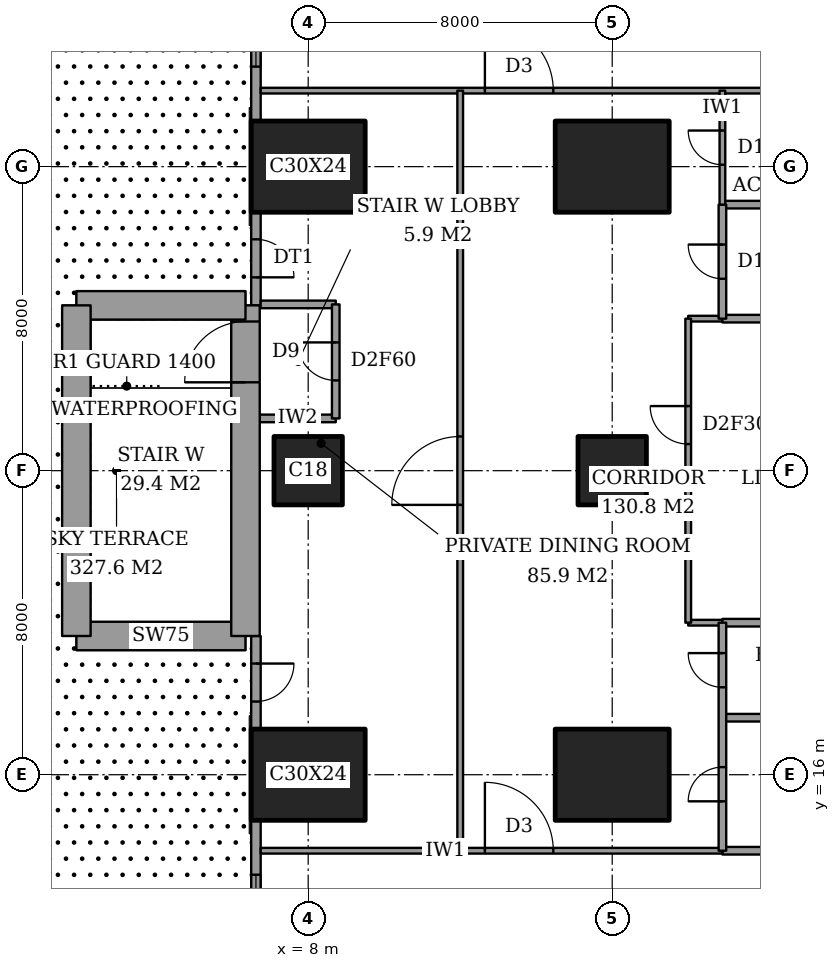
"""IFC4 building model, lengths in metres.
Left out: names, types, materials, properties, quantities, classifications, styles, units other than length and angle.
Written with IfcOpenShell. Run it as: python <this file> out.ifc"""

import sys

from ifc_helpers import new_model, si_unit, direction, frame, frame_2d, origin, origin_2d, place, context, subcontext, project, spatial, rectangle, extrude, element, fill, save


model = new_model("IFC4")
c1 = context("Model", 3, precision=1e-05, world=origin(), true_north=direction((0.0, 1.0)))
c2 = subcontext(c1, "Body", "Model", "MODEL_VIEW")
j1 = project(units=[si_unit("LENGTHUNIT", "METRE"), si_unit("PLANEANGLEUNIT", "RADIAN")], contexts=[c1])
p1 = place(None, origin())
s1 = spatial("IfcSite", under=j1, at=p1, CompositionType="ELEMENT")
p2 = place(p1, origin())
s2 = spatial("IfcBuilding", under=s1, at=p2, CompositionType="ELEMENT")
p3 = place(p2, frame((0.0, 0.0, 218.2)))
s3 = spatial("IfcBuildingStorey", under=s2, at=p3, CompositionType="ELEMENT", Elevation=218.2)
p4 = place(p3, frame((8.0, 16.0, 0.0), z_axis=(0.0, 0.0, 1.0), x_axis=(1.0, 0.0, 0.0)))
e1 = element("IfcColumn", 1, at=p4, inside=s3, PredefinedType="COLUMN", context=c2, shape_type="SweptSolid", body=[
    extrude(rectangle(XDim=3.0, YDim=2.4, at=origin_2d()), origin(), (0.0, 0.0, 1.0), 3.6),
])
p5 = place(p3, frame((8.0, 24.0, 0.0), z_axis=(0.0, 0.0, 1.0), x_axis=(1.0, 0.0, 0.0)))
e2 = element("IfcColumn", 2, at=p5, inside=s3, PredefinedType="COLUMN", context=c2, shape_type="SweptSolid", body=[
    extrude(rectangle(XDim=1.8, YDim=1.8, at=origin_2d()), origin(), (0.0, 0.0, 1.0), 3.6),
])
for number, where, z_axis, x_axis in (
    (3, (8.0, 32.0, 0.0), (0.0, 0.0, 1.0), (1.0, 0.0, 0.0)),
    (4, (16.0, 16.0, 0.0), (0.0, 0.0, 1.0), (1.0, 0.0, 0.0)),
):
    element("IfcColumn", number, at=place(p3, frame(where, z_axis=z_axis, x_axis=x_axis)), inside=s3, PredefinedType="COLUMN", context=c2, shape_type="SweptSolid", body=[
        extrude(rectangle(XDim=3.0, YDim=2.4, at=origin_2d()), origin(), (0.0, 0.0, 1.0), 3.6),
    ])
p6 = place(p3, frame((16.0, 24.0, 0.0), z_axis=(0.0, 0.0, 1.0), x_axis=(1.0, 0.0, 0.0)))
e5 = element("IfcColumn", 5, at=p6, inside=s3, PredefinedType="COLUMN", context=c2, shape_type="SweptSolid", body=[
    extrude(rectangle(XDim=1.8, YDim=1.8, at=origin_2d()), origin(), (0.0, 0.0, 1.0), 3.6),
])
p7 = place(p3, frame((16.0, 32.0, 0.0), z_axis=(0.0, 0.0, 1.0), x_axis=(1.0, 0.0, 0.0)))
e6 = element("IfcColumn", 6, at=p7, inside=s3, PredefinedType="COLUMN", context=c2, shape_type="SweptSolid", body=[
    extrude(rectangle(XDim=3.0, YDim=2.4, at=origin_2d()), origin(), (0.0, 0.0, 1.0), 3.6),
])
p8 = place(p3, frame((1.9, 19.65, 0.0), z_axis=(0.0, 0.0, 1.0), x_axis=(1.0, 0.0, 0.0)))
e7 = element("IfcWall", 7, at=p8, inside=s3, PredefinedType="SHEAR", context=c2, shape_type="SweptSolid", body=[
    extrude(rectangle(XDim=4.45, YDim=0.75, at=frame_2d((2.225, 0.0))), origin(), (0.0, 0.0, 1.0), 3.6),
])
p9 = place(p3, frame((6.35, 19.65, 0.0), z_axis=(0.0, 0.0, 1.0), x_axis=(0.0, 1.0, 0.0)))
e8 = element("IfcWall", 8, at=p9, inside=s3, PredefinedType="SHEAR", context=c2, shape_type="SweptSolid", body=[
    extrude(rectangle(XDim=8.7, YDim=0.75, at=frame_2d((4.35, 0.0))), origin(), (0.0, 0.0, 1.0), 3.6),
])
p10 = place(p9, frame((6.675, 0.0, 0.0)))
e9 = element("IfcOpeningElement", 9, at=p10, cuts=e8, PredefinedType="OPENING", context=c2, shape_type="SweptSolid", body=[
    extrude(rectangle(XDim=1.6, YDim=2.1, at=frame_2d((0.8, 1.05))), frame((0.0, 0.385, 0.0), z_axis=(0.0, -1.0, 0.0), x_axis=(1.0, 0.0, 0.0)), (0.0, 0.0, 1.0), 0.77),
])
p11 = place(p3, frame((6.35, 28.35, 0.0), z_axis=(0.0, 0.0, 1.0), x_axis=(-1.0, 0.0, 0.0)))
e10 = element("IfcWall", 10, at=p11, inside=s3, PredefinedType="SHEAR", context=c2, shape_type="SweptSolid", body=[
    extrude(rectangle(XDim=4.45, YDim=0.75, at=frame_2d((2.225, 0.0))), origin(), (0.0, 0.0, 1.0), 3.6),
])
p12 = place(p3, frame((1.9, 28.35, 0.0), z_axis=(0.0, 0.0, 1.0), x_axis=(0.0, -1.0, 0.0)))
e11 = element("IfcWall", 11, at=p12, inside=s3, PredefinedType="SHEAR", context=c2, shape_type="SweptSolid", body=[
    extrude(rectangle(XDim=8.7, YDim=0.75, at=frame_2d((4.35, 0.0))), origin(), (0.0, 0.0, 1.0), 3.6),
])
p13 = place(p3, frame((6.625, 48.575, 0.0), z_axis=(0.0, 0.0, 1.0), x_axis=(0.0, -1.0, 0.0)))
e12 = element("IfcWall", 12, at=p13, inside=s3, PredefinedType="SOLIDWALL", context=c2, shape_type="SweptSolid", body=[
    extrude(rectangle(XDim=20.225, YDim=0.25, at=frame_2d((10.112, 0.0))), origin(), (0.0, 0.0, 1.0), 3.6),
])
p14 = place(p13, frame((6.55, 0.0, 0.0)))
e13 = element("IfcOpeningElement", 13, at=p14, cuts=e12, PredefinedType="OPENING", context=c2, shape_type="SweptSolid", body=[
    extrude(rectangle(XDim=1.0, YDim=2.4, at=frame_2d((0.5, 1.2))), frame((0.0, 0.135, 0.0), z_axis=(0.0, -1.0, 0.0), x_axis=(1.0, 0.0, 0.0)), (0.0, 0.0, 1.0), 0.27),
])
p15 = place(p13, frame((1.988, 0.0, 0.2)))
e14 = element("IfcOpeningElement", 14, at=p15, cuts=e12, PredefinedType="OPENING", context=c2, shape_type="SweptSolid", body=[
    extrude(rectangle(XDim=2.4, YDim=2.4, at=frame_2d((1.2, 1.2))), frame((0.0, 0.135, 0.0), z_axis=(0.0, -1.0, 0.0), x_axis=(1.0, 0.0, 0.0)), (0.0, 0.0, 1.0), 0.27),
])
p16 = place(p13, frame((8.481, 0.0, 0.2)))
e15 = element("IfcOpeningElement", 15, at=p16, cuts=e12, PredefinedType="OPENING", context=c2, shape_type="SweptSolid", body=[
    extrude(rectangle(XDim=2.4, YDim=2.4, at=frame_2d((1.2, 1.2))), frame((0.0, 0.135, 0.0), z_axis=(0.0, -1.0, 0.0), x_axis=(1.0, 0.0, 0.0)), (0.0, 0.0, 1.0), 0.27),
])
p17 = place(p13, frame((11.544, 0.0, 0.2)))
e16 = element("IfcOpeningElement", 16, at=p17, cuts=e12, PredefinedType="OPENING", context=c2, shape_type="SweptSolid", body=[
    extrude(rectangle(XDim=2.4, YDim=2.4, at=frame_2d((1.2, 1.2))), frame((0.0, 0.135, 0.0), z_axis=(0.0, -1.0, 0.0), x_axis=(1.0, 0.0, 0.0)), (0.0, 0.0, 1.0), 0.27),
])
p18 = place(p13, frame((18.488, 0.0, 0.0)))
e17 = element("IfcOpeningElement", 17, at=p18, cuts=e12, PredefinedType="OPENING", context=c2, shape_type="SweptSolid", body=[
    extrude(rectangle(XDim=1.0, YDim=2.4, at=frame_2d((0.5, 1.2))), frame((0.0, 0.135, 0.0), z_axis=(0.0, -1.0, 0.0), x_axis=(1.0, 0.0, 0.0)), (0.0, 0.0, 1.0), 0.27),
])
p19 = place(p3, frame((6.625, 19.65, 0.0), z_axis=(0.0, 0.0, 1.0), x_axis=(0.0, -1.0, 0.0)))
e18 = element("IfcWall", 18, at=p19, inside=s3, PredefinedType="SOLIDWALL", context=c2, shape_type="SweptSolid", body=[
    extrude(rectangle(XDim=20.225, YDim=0.25, at=frame_2d((10.112, 0.0))), origin(), (0.0, 0.0, 1.0), 3.6),
])
p20 = place(p19, frame((0.725, 0.0, 0.0)))
e19 = element("IfcOpeningElement", 19, at=p20, cuts=e18, PredefinedType="OPENING", context=c2, shape_type="SweptSolid", body=[
    extrude(rectangle(XDim=1.0, YDim=2.4, at=frame_2d((0.5, 1.2))), frame((0.0, 0.135, 0.0), z_axis=(0.0, -1.0, 0.0), x_axis=(1.0, 0.0, 0.0)), (0.0, 0.0, 1.0), 0.27),
])
p21 = place(p19, frame((12.675, 0.0, 0.0)))
e20 = element("IfcOpeningElement", 20, at=p21, cuts=e18, PredefinedType="OPENING", context=c2, shape_type="SweptSolid", body=[
    extrude(rectangle(XDim=1.0, YDim=2.4, at=frame_2d((0.5, 1.2))), frame((0.0, 0.135, 0.0), z_axis=(0.0, -1.0, 0.0), x_axis=(1.0, 0.0, 0.0)), (0.0, 0.0, 1.0), 0.27),
])
p22 = place(p19, frame((6.281, 0.0, 0.2)))
e21 = element("IfcOpeningElement", 21, at=p22, cuts=e18, PredefinedType="OPENING", context=c2, shape_type="SweptSolid", body=[
    extrude(rectangle(XDim=2.4, YDim=2.4, at=frame_2d((1.2, 1.2))), frame((0.0, 0.135, 0.0), z_axis=(0.0, -1.0, 0.0), x_axis=(1.0, 0.0, 0.0)), (0.0, 0.0, 1.0), 0.27),
])
p23 = place(p19, frame((9.344, 0.0, 0.2)))
e22 = element("IfcOpeningElement", 22, at=p23, cuts=e18, PredefinedType="OPENING", context=c2, shape_type="SweptSolid", body=[
    extrude(rectangle(XDim=2.4, YDim=2.4, at=frame_2d((1.2, 1.2))), frame((0.0, 0.135, 0.0), z_axis=(0.0, -1.0, 0.0), x_axis=(1.0, 0.0, 0.0)), (0.0, 0.0, 1.0), 0.27),
])
p24 = place(p19, frame((15.837, 0.0, 0.2)))
e23 = element("IfcOpeningElement", 23, at=p24, cuts=e18, PredefinedType="OPENING", context=c2, shape_type="SweptSolid", body=[
    extrude(rectangle(XDim=2.4, YDim=2.4, at=frame_2d((1.2, 1.2))), frame((0.0, 0.135, 0.0), z_axis=(0.0, -1.0, 0.0), x_axis=(1.0, 0.0, 0.0)), (0.0, 0.0, 1.0), 0.27),
])
p25 = place(p3, frame((18.9, 14.0, 0.0), z_axis=(0.0, 0.0, 1.0), x_axis=(1.0, 0.0, 0.0)))
e24 = element("IfcWall", 24, at=p25, inside=s3, PredefinedType="PARTITIONING", context=c2, shape_type="SweptSolid", body=[
    extrude(rectangle(XDim=5.1, YDim=0.2, at=frame_2d((2.55, 0.0))), origin(), (0.0, 0.0, 1.0), 3.35),
])
p26 = place(p3, frame((6.75, 14.0, 0.0), z_axis=(0.0, 0.0, 1.0), x_axis=(1.0, 0.0, 0.0)))
e25 = element("IfcWall", 25, at=p26, inside=s3, PredefinedType="PARTITIONING", context=c2, shape_type="SweptSolid", body=[
    extrude(rectangle(XDim=12.15, YDim=0.15, at=frame_2d((6.075, 0.0))), origin(), (0.0, 0.0, 1.0), 3.35),
])
p27 = place(p26, frame((5.9, 0.0, 0.0)))
e26 = element("IfcOpeningElement", 26, at=p27, cuts=e25, PredefinedType="OPENING", context=c2, shape_type="SweptSolid", body=[
    extrude(rectangle(XDim=1.8, YDim=2.1, at=frame_2d((0.9, 1.05))), frame((0.0, 0.085, 0.0), z_axis=(0.0, -1.0, 0.0), x_axis=(1.0, 0.0, 0.0)), (0.0, 0.0, 1.0), 0.17),
])
for number, where, z_axis, x_axis in (
    (27, (18.9, 17.5, 0.0), (0.0, 0.0, 1.0), (1.0, 0.0, 0.0)),
    (28, (18.9, 20.0, 0.0), (0.0, 0.0, 1.0), (1.0, 0.0, 0.0)),
):
    element("IfcWall", number, at=place(p3, frame(where, z_axis=z_axis, x_axis=x_axis)), inside=s3, PredefinedType="PARTITIONING", context=c2, shape_type="SweptSolid", body=[
        extrude(rectangle(XDim=5.1, YDim=0.2, at=frame_2d((2.55, 0.0))), origin(), (0.0, 0.0, 1.0), 3.35),
    ])
p28 = place(p3, frame((18.0, 20.0, 0.0), z_axis=(0.0, 0.0, 1.0), x_axis=(1.0, 0.0, 0.0)))
e29 = element("IfcWall", 29, at=p28, inside=s3, PredefinedType="PARTITIONING", context=c2, shape_type="SweptSolid", body=[
    extrude(rectangle(XDim=0.9, YDim=0.15, at=frame_2d((0.45, 0.0))), origin(), (0.0, 0.0, 1.0), 3.35),
])
p29 = place(p3, frame((6.725, 25.375, 0.0), z_axis=(0.0, 0.0, 1.0), x_axis=(1.0, 0.0, 0.0)))
e30 = element("IfcWall", 30, at=p29, inside=s3, PredefinedType="PARTITIONING", context=c2, shape_type="SweptSolid", body=[
    extrude(rectangle(XDim=2.0, YDim=0.2, at=frame_2d((1.0, 0.0))), origin(), (0.0, 0.0, 1.0), 3.35),
])
p30 = place(p3, frame((18.9, 28.0, 0.0), z_axis=(0.0, 0.0, 1.0), x_axis=(1.0, 0.0, 0.0)))
e31 = element("IfcWall", 31, at=p30, inside=s3, PredefinedType="PARTITIONING", context=c2, shape_type="SweptSolid", body=[
    extrude(rectangle(XDim=5.1, YDim=0.2, at=frame_2d((2.55, 0.0))), origin(), (0.0, 0.0, 1.0), 3.35),
])
p31 = place(p3, frame((18.0, 28.0, 0.0), z_axis=(0.0, 0.0, 1.0), x_axis=(1.0, 0.0, 0.0)))
e32 = element("IfcWall", 32, at=p31, inside=s3, PredefinedType="PARTITIONING", context=c2, shape_type="SweptSolid", body=[
    extrude(rectangle(XDim=0.9, YDim=0.15, at=frame_2d((0.45, 0.0))), origin(), (0.0, 0.0, 1.0), 3.35),
])
p32 = place(p3, frame((6.75, 28.375, 0.0), z_axis=(0.0, 0.0, 1.0), x_axis=(1.0, 0.0, 0.0)))
e33 = element("IfcWall", 33, at=p32, inside=s3, PredefinedType="PARTITIONING", context=c2, shape_type="SweptSolid", body=[
    extrude(rectangle(XDim=1.975, YDim=0.2, at=frame_2d((0.988, 0.0))), origin(), (0.0, 0.0, 1.0), 3.35),
])
p33 = place(p3, frame((18.9, 31.0, 0.0), z_axis=(0.0, 0.0, 1.0), x_axis=(1.0, 0.0, 0.0)))
e34 = element("IfcWall", 34, at=p33, inside=s3, PredefinedType="PARTITIONING", context=c2, shape_type="SweptSolid", body=[
    extrude(rectangle(XDim=5.1, YDim=0.2, at=frame_2d((2.55, 0.0))), origin(), (0.0, 0.0, 1.0), 3.35),
])
p34 = place(p3, frame((6.75, 34.0, 0.0), z_axis=(0.0, 0.0, 1.0), x_axis=(1.0, 0.0, 0.0)))
e35 = element("IfcWall", 35, at=p34, inside=s3, PredefinedType="PARTITIONING", context=c2, shape_type="SweptSolid", body=[
    extrude(rectangle(XDim=17.25, YDim=0.15, at=frame_2d((8.625, 0.0))), origin(), (0.0, 0.0, 1.0), 3.35),
])
p35 = place(p34, frame((5.9, 0.0, 0.0)))
e36 = element("IfcOpeningElement", 36, at=p35, cuts=e35, PredefinedType="OPENING", context=c2, shape_type="SweptSolid", body=[
    extrude(rectangle(XDim=1.8, YDim=2.1, at=frame_2d((0.9, 1.05))), frame((0.0, 0.085, 0.0), z_axis=(0.0, -1.0, 0.0), x_axis=(1.0, 0.0, 0.0)), (0.0, 0.0, 1.0), 0.17),
])
p36 = place(p3, frame((8.725, 25.375, 0.0), z_axis=(0.0, 0.0, 1.0), x_axis=(0.0, 1.0, 0.0)))
e37 = element("IfcWall", 37, at=p36, inside=s3, PredefinedType="PARTITIONING", context=c2, shape_type="SweptSolid", body=[
    extrude(rectangle(XDim=3.0, YDim=0.2, at=frame_2d((1.5, 0.0))), origin(), (0.0, 0.0, 1.0), 3.35),
])
p37 = place(p36, frame((1.0, 0.0, 0.0)))
e38 = element("IfcOpeningElement", 38, at=p37, cuts=e37, PredefinedType="OPENING", context=c2, shape_type="SweptSolid", body=[
    extrude(rectangle(XDim=1.0, YDim=2.1, at=frame_2d((0.5, 1.05))), frame((0.0, 0.11, 0.0), z_axis=(0.0, -1.0, 0.0), x_axis=(1.0, 0.0, 0.0)), (0.0, 0.0, 1.0), 0.22),
])
p38 = place(p3, frame((12.0, 14.0, 0.0), z_axis=(0.0, 0.0, 1.0), x_axis=(0.0, 1.0, 0.0)))
e39 = element("IfcWall", 39, at=p38, inside=s3, PredefinedType="PARTITIONING", context=c2, shape_type="SweptSolid", body=[
    extrude(rectangle(XDim=20.0, YDim=0.15, at=frame_2d((10.0, 0.0))), origin(), (0.0, 0.0, 1.0), 3.35),
])
p39 = place(p38, frame((9.1, 0.0, 0.0)))
e40 = element("IfcOpeningElement", 40, at=p39, cuts=e39, PredefinedType="OPENING", context=c2, shape_type="SweptSolid", body=[
    extrude(rectangle(XDim=1.8, YDim=2.1, at=frame_2d((0.9, 1.05))), frame((0.0, 0.085, 0.0), z_axis=(0.0, -1.0, 0.0), x_axis=(1.0, 0.0, 0.0)), (0.0, 0.0, 1.0), 0.17),
])
p40 = place(p3, frame((18.0, 20.0, 0.0), z_axis=(0.0, 0.0, 1.0), x_axis=(0.0, 1.0, 0.0)))
e41 = element("IfcWall", 41, at=p40, inside=s3, PredefinedType="PARTITIONING", context=c2, shape_type="SweptSolid", body=[
    extrude(rectangle(XDim=8.0, YDim=0.15, at=frame_2d((4.0, 0.0))), origin(), (0.0, 0.0, 1.0), 3.35),
])
p41 = place(p40, frame((4.7, 0.0, 0.0)))
e42 = element("IfcOpeningElement", 42, at=p41, cuts=e41, PredefinedType="OPENING", context=c2, shape_type="SweptSolid", body=[
    extrude(rectangle(XDim=1.0, YDim=2.1, at=frame_2d((0.5, 1.05))), frame((0.0, 0.085, 0.0), z_axis=(0.0, -1.0, 0.0), x_axis=(1.0, 0.0, 0.0)), (0.0, 0.0, 1.0), 0.17),
])
p42 = place(p3, frame((18.9, 14.0, 0.0), z_axis=(0.0, 0.0, 1.0), x_axis=(0.0, 1.0, 0.0)))
e43 = element("IfcWall", 43, at=p42, inside=s3, PredefinedType="PARTITIONING", context=c2, shape_type="SweptSolid", body=[
    extrude(rectangle(XDim=6.0, YDim=0.2, at=frame_2d((3.0, 0.0))), origin(), (0.0, 0.0, 1.0), 3.35),
])
p43 = place(p42, frame((1.3, 0.0, 0.0)))
e44 = element("IfcOpeningElement", 44, at=p43, cuts=e43, PredefinedType="OPENING", context=c2, shape_type="SweptSolid", body=[
    extrude(rectangle(XDim=0.9, YDim=2.1, at=frame_2d((0.45, 1.05))), frame((0.0, 0.11, 0.0), z_axis=(0.0, -1.0, 0.0), x_axis=(1.0, 0.0, 0.0)), (0.0, 0.0, 1.0), 0.22),
])
p44 = place(p42, frame((4.3, 0.0, 0.0)))
e45 = element("IfcOpeningElement", 45, at=p44, cuts=e43, PredefinedType="OPENING", context=c2, shape_type="SweptSolid", body=[
    extrude(rectangle(XDim=0.9, YDim=2.1, at=frame_2d((0.45, 1.05))), frame((0.0, 0.11, 0.0), z_axis=(0.0, -1.0, 0.0), x_axis=(1.0, 0.0, 0.0)), (0.0, 0.0, 1.0), 0.22),
])
p45 = place(p3, frame((18.9, 28.0, 0.0), z_axis=(0.0, 0.0, 1.0), x_axis=(0.0, 1.0, 0.0)))
e46 = element("IfcWall", 46, at=p45, inside=s3, PredefinedType="PARTITIONING", context=c2, shape_type="SweptSolid", body=[
    extrude(rectangle(XDim=3.0, YDim=0.2, at=frame_2d((1.5, 0.0))), origin(), (0.0, 0.0, 1.0), 3.35),
])
p46 = place(p45, frame((1.05, 0.0, 0.0)))
e47 = element("IfcOpeningElement", 47, at=p46, cuts=e46, PredefinedType="OPENING", context=c2, shape_type="SweptSolid", body=[
    extrude(rectangle(XDim=0.9, YDim=2.1, at=frame_2d((0.45, 1.05))), frame((0.0, 0.11, 0.0), z_axis=(0.0, -1.0, 0.0), x_axis=(1.0, 0.0, 0.0)), (0.0, 0.0, 1.0), 0.22),
])
p47 = place(p3, frame((18.9, 31.0, 0.0), z_axis=(0.0, 0.0, 1.0), x_axis=(0.0, 1.0, 0.0)))
e48 = element("IfcWall", 48, at=p47, inside=s3, PredefinedType="PARTITIONING", context=c2, shape_type="SweptSolid", body=[
    extrude(rectangle(XDim=3.0, YDim=0.15, at=frame_2d((1.5, 0.0))), origin(), (0.0, 0.0, 1.0), 3.35),
])
p48 = place(p47, frame((1.05, 0.0, 0.0)))
e49 = element("IfcOpeningElement", 49, at=p48, cuts=e48, PredefinedType="OPENING", context=c2, shape_type="SweptSolid", body=[
    extrude(rectangle(XDim=0.9, YDim=2.1, at=frame_2d((0.45, 1.05))), frame((0.0, 0.085, 0.0), z_axis=(0.0, -1.0, 0.0), x_axis=(1.0, 0.0, 0.0)), (0.0, 0.0, 1.0), 0.17),
])
p49 = place(p17, origin())
e50 = element("IfcWindow", 50, at=p49, inside=s3, PartitioningType="SINGLE_PANEL", PredefinedType="WINDOW", context=c2, shape_type="SweptSolid", body=[
    extrude(rectangle(XDim=2.4, YDim=2.4, at=frame_2d((1.2, 1.2))), frame((0.0, 0.03, 0.0), z_axis=(0.0, -1.0, 0.0), x_axis=(1.0, 0.0, 0.0)), (0.0, 0.0, 1.0), 0.06),
])
fill(e16, e50)
p50 = place(p18, origin())
e51 = element("IfcDoor", 51, at=p50, inside=s3, OperationType="SINGLE_SWING_LEFT", PredefinedType="DOOR", context=c2, shape_type="SweptSolid", body=[
    extrude(rectangle(XDim=1.0, YDim=2.4, at=frame_2d((0.5, 1.2))), frame((0.0, 0.025, 0.0), z_axis=(0.0, -1.0, 0.0), x_axis=(1.0, 0.0, 0.0)), (0.0, 0.0, 1.0), 0.05),
])
fill(e17, e51)
p51 = place(p20, origin())
e52 = element("IfcDoor", 52, at=p51, inside=s3, OperationType="SINGLE_SWING_RIGHT", PredefinedType="DOOR", context=c2, shape_type="SweptSolid", body=[
    extrude(rectangle(XDim=1.0, YDim=2.4, at=frame_2d((0.5, 1.2))), frame((0.0, 0.025, 0.0), z_axis=(0.0, -1.0, 0.0), x_axis=(1.0, 0.0, 0.0)), (0.0, 0.0, 1.0), 0.05),
])
fill(e19, e52)
p52 = place(p22, origin())
e53 = element("IfcWindow", 53, at=p52, inside=s3, PartitioningType="SINGLE_PANEL", PredefinedType="WINDOW", context=c2, shape_type="SweptSolid", body=[
    extrude(rectangle(XDim=2.4, YDim=2.4, at=frame_2d((1.2, 1.2))), frame((0.0, 0.03, 0.0), z_axis=(0.0, -1.0, 0.0), x_axis=(1.0, 0.0, 0.0)), (0.0, 0.0, 1.0), 0.06),
])
fill(e21, e53)
p53 = place(p27, origin())
e54 = element("IfcDoor", 54, at=p53, inside=s3, OperationType="DOUBLE_DOOR_DOUBLE_SWING", PredefinedType="DOOR", context=c2, shape_type="SweptSolid", body=[
    extrude(rectangle(XDim=1.8, YDim=2.1, at=frame_2d((0.9, 1.05))), frame((0.0, 0.025, 0.0), z_axis=(0.0, -1.0, 0.0), x_axis=(1.0, 0.0, 0.0)), (0.0, 0.0, 1.0), 0.05),
])
fill(e26, e54)
p54 = place(p39, origin())
e55 = element("IfcDoor", 55, at=p54, inside=s3, OperationType="DOUBLE_DOOR_DOUBLE_SWING", PredefinedType="DOOR", context=c2, shape_type="SweptSolid", body=[
    extrude(rectangle(XDim=1.8, YDim=2.1, at=frame_2d((0.9, 1.05))), frame((0.0, 0.025, 0.0), z_axis=(0.0, -1.0, 0.0), x_axis=(1.0, 0.0, 0.0)), (0.0, 0.0, 1.0), 0.05),
])
fill(e40, e55)
p55 = place(p35, origin())
e56 = element("IfcDoor", 56, at=p55, inside=s3, OperationType="DOUBLE_DOOR_DOUBLE_SWING", PredefinedType="DOOR", context=c2, shape_type="SweptSolid", body=[
    extrude(rectangle(XDim=1.8, YDim=2.1, at=frame_2d((0.9, 1.05))), frame((0.0, 0.025, 0.0), z_axis=(0.0, -1.0, 0.0), x_axis=(1.0, 0.0, 0.0)), (0.0, 0.0, 1.0), 0.05),
])
fill(e36, e56)
p56 = place(p41, origin())
e57 = element("IfcDoor", 57, at=p56, inside=s3, OperationType="SINGLE_SWING_LEFT", PredefinedType="DOOR", context=c2, shape_type="SweptSolid", body=[
    extrude(rectangle(XDim=1.0, YDim=2.1, at=frame_2d((0.5, 1.05))), frame((0.0, 0.025, 0.0), z_axis=(0.0, -1.0, 0.0), x_axis=(1.0, 0.0, 0.0)), (0.0, 0.0, 1.0), 0.05),
])
fill(e42, e57)
p57 = place(p43, origin())
e58 = element("IfcDoor", 58, at=p57, inside=s3, OperationType="SINGLE_SWING_RIGHT", PredefinedType="DOOR", context=c2, shape_type="SweptSolid", body=[
    extrude(rectangle(XDim=0.9, YDim=2.1, at=frame_2d((0.45, 1.05))), frame((0.0, 0.025, 0.0), z_axis=(0.0, -1.0, 0.0), x_axis=(1.0, 0.0, 0.0)), (0.0, 0.0, 1.0), 0.05),
])
fill(e44, e58)
p58 = place(p44, origin())
e59 = element("IfcDoor", 59, at=p58, inside=s3, OperationType="SINGLE_SWING_LEFT", PredefinedType="DOOR", context=c2, shape_type="SweptSolid", body=[
    extrude(rectangle(XDim=0.9, YDim=2.1, at=frame_2d((0.45, 1.05))), frame((0.0, 0.025, 0.0), z_axis=(0.0, -1.0, 0.0), x_axis=(1.0, 0.0, 0.0)), (0.0, 0.0, 1.0), 0.05),
])
fill(e45, e59)
p59 = place(p46, origin())
e60 = element("IfcDoor", 60, at=p59, inside=s3, OperationType="SINGLE_SWING_LEFT", PredefinedType="DOOR", context=c2, shape_type="SweptSolid", body=[
    extrude(rectangle(XDim=0.9, YDim=2.1, at=frame_2d((0.45, 1.05))), frame((0.0, 0.025, 0.0), z_axis=(0.0, -1.0, 0.0), x_axis=(1.0, 0.0, 0.0)), (0.0, 0.0, 1.0), 0.05),
])
fill(e47, e60)
p60 = place(p48, origin())
e61 = element("IfcDoor", 61, at=p60, inside=s3, OperationType="SINGLE_SWING_LEFT", PredefinedType="DOOR", context=c2, shape_type="SweptSolid", body=[
    extrude(rectangle(XDim=0.9, YDim=2.1, at=frame_2d((0.45, 1.05))), frame((0.0, 0.025, 0.0), z_axis=(0.0, -1.0, 0.0), x_axis=(1.0, 0.0, 0.0)), (0.0, 0.0, 1.0), 0.05),
])
fill(e49, e61)
p61 = place(p37, origin())
e62 = element("IfcDoor", 62, at=p61, inside=s3, OperationType="SINGLE_SWING_LEFT", PredefinedType="DOOR", context=c2, shape_type="SweptSolid", body=[
    extrude(rectangle(XDim=1.0, YDim=2.1, at=frame_2d((0.5, 1.05))), frame((0.0, 0.025, 0.0), z_axis=(0.0, -1.0, 0.0), x_axis=(1.0, 0.0, 0.0)), (0.0, 0.0, 1.0), 0.05),
])
fill(e38, e62)
p62 = place(p10, origin())
e63 = element("IfcDoor", 63, at=p62, inside=s3, OperationType="DOUBLE_DOOR_SINGLE_SWING", PredefinedType="DOOR", context=c2, shape_type="SweptSolid", body=[
    extrude(rectangle(XDim=1.6, YDim=2.1, at=frame_2d((0.8, 1.05))), frame((0.0, 0.025, 0.0), z_axis=(0.0, -1.0, 0.0), x_axis=(1.0, 0.0, 0.0)), (0.0, 0.0, 1.0), 0.05),
])
fill(e9, e63)
save(model, sys.argv[1])
